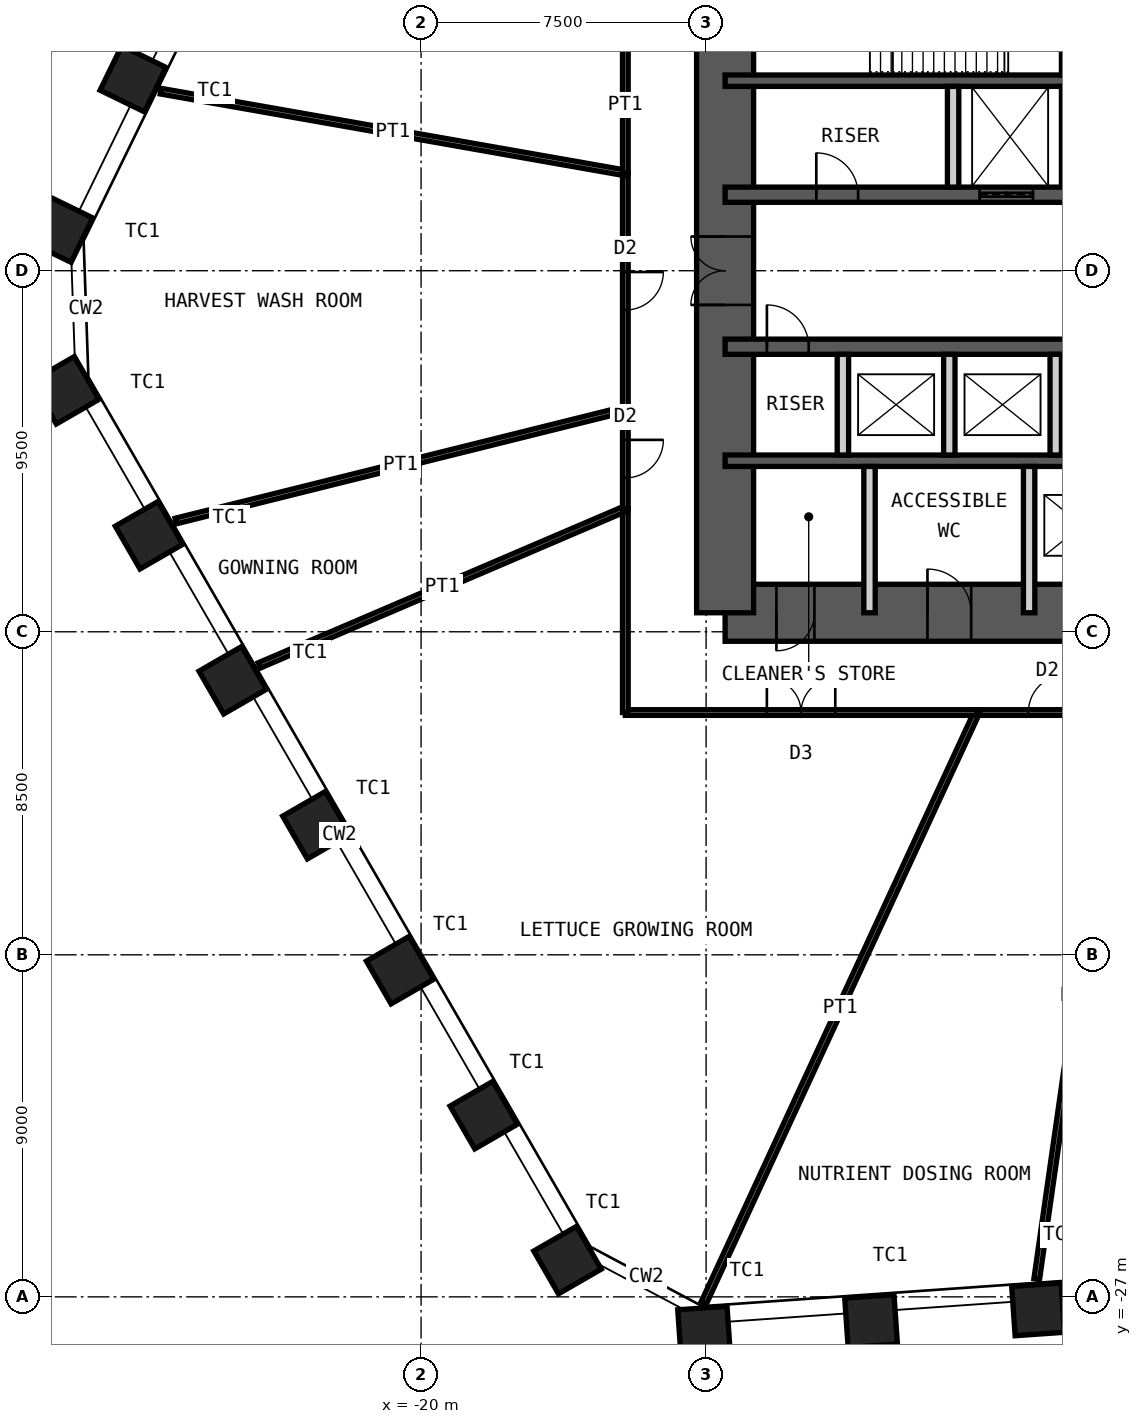
"""IFC4 building model, lengths in metres.
Left out: names, types, materials, properties, quantities, classifications, styles, units other than length and angle.
Written with IfcOpenShell. Run it as: python <this file> out.ifc"""

import sys

from ifc_helpers import new_model, si_unit, direction, frame, frame_2d, origin, origin_2d, place, context, subcontext, project, spatial, rectangle, hollow_rectangle, extrude, element, fill, save


model = new_model("IFC4")
c1 = context("Model", 3, precision=1e-05, world=origin(), true_north=direction((0.0, 1.0)))
c2 = subcontext(c1, "Body", "Model", "MODEL_VIEW")
j1 = project(units=[si_unit("LENGTHUNIT", "METRE"), si_unit("PLANEANGLEUNIT", "RADIAN")], contexts=[c1])
p1 = place(None, origin())
s1 = spatial("IfcSite", under=j1, at=p1, CompositionType="ELEMENT")
p2 = place(p1, origin())
s2 = spatial("IfcBuilding", under=s1, at=p2, CompositionType="ELEMENT")
p3 = place(p2, frame((0.0, 0.0, 37.0)))
s3 = spatial("IfcBuildingStorey", under=s2, at=p3, CompositionType="ELEMENT", Elevation=37.0)
for number, where, z_axis, x_axis in (
    (1, (-3.765, -27.329, 0.0), (0.0, 0.0, 1.0), (0.998, 0.07, 0.0)),
    (2, (-8.159, -27.636, 0.0), (0.0, 0.0, 1.0), (0.998, 0.07, 0.0)),
    (3, (-12.553, -27.944, 0.0), (0.0, 0.0, 1.0), (0.998, 0.07, 0.0)),
    (4, (-16.147, -26.033, 0.0), (0.0, 0.0, 1.0), (0.5, -0.866, 0.0)),
    (5, (-18.349, -22.218, 0.0), (0.0, 0.0, 1.0), (0.5, -0.866, 0.0)),
    (6, (-20.552, -18.404, 0.0), (0.0, 0.0, 1.0), (0.5, -0.866, 0.0)),
    (7, (-22.754, -14.589, 0.0), (0.0, 0.0, 1.0), (0.5, -0.866, 0.0)),
    (8, (-24.956, -10.775, 0.0), (0.0, 0.0, 1.0), (0.5, -0.866, 0.0)),
    (9, (-27.158, -6.96, 0.0), (0.0, 0.0, 1.0), (0.5, -0.866, 0.0)),
    (10, (-29.361, -3.146, 0.0), (0.0, 0.0, 1.0), (0.5, -0.866, 0.0)),
    (11, (-29.509, 1.09, 0.0), (0.0, 0.0, 1.0), (-0.438, -0.899, 0.0)),
    (12, (-27.578, 5.049, 0.0), (0.0, 0.0, 1.0), (-0.438, -0.899, 0.0)),
):
    element("IfcColumn", number, at=place(p3, frame(where, z_axis=z_axis, x_axis=x_axis)), inside=s3, PredefinedType="COLUMN", context=c2, shape_type="SweptSolid", body=[
        extrude(hollow_rectangle(XDim=1.3, YDim=1.3, WallThickness=0.1, at=origin_2d()), origin(), (0.0, 0.0, 1.0), 5.0),
    ])
p4 = place(p3, frame((-12.0, -9.0, 0.0), z_axis=(0.0, 0.0, 1.0), x_axis=(1.0, 0.0, 0.0)))
e13 = element("IfcWall", 13, at=p4, inside=s3, PredefinedType="SHEAR", context=c2, shape_type="SweptSolid", body=[
    extrude(rectangle(XDim=24.0, YDim=1.5, at=frame_2d((12.0, 0.0))), origin(), (0.0, 0.0, 1.0), 5.0),
])
p5 = place(p4, frame((1.35, 0.0, 0.0)))
e14 = element("IfcOpeningElement", 14, at=p5, cuts=e13, PredefinedType="OPENING", context=c2, shape_type="SweptSolid", body=[
    extrude(rectangle(XDim=1.0, YDim=2.1, at=frame_2d((0.5, 1.05))), frame((0.0, 0.76, 0.0), z_axis=(0.0, -1.0, 0.0), x_axis=(1.0, 0.0, 0.0)), (0.0, 0.0, 1.0), 1.52),
])
p6 = place(p4, frame((5.325, 0.0, 0.0)))
e15 = element("IfcOpeningElement", 15, at=p6, cuts=e13, PredefinedType="OPENING", context=c2, shape_type="SweptSolid", body=[
    extrude(rectangle(XDim=1.15, YDim=2.1, at=frame_2d((0.575, 1.05))), frame((0.0, 0.76, 0.0), z_axis=(0.0, -1.0, 0.0), x_axis=(1.0, 0.0, 0.0)), (0.0, 0.0, 1.0), 1.52),
])
p7 = place(p4, frame((12.6, 0.0, 0.0)))
e16 = element("IfcOpeningElement", 16, at=p7, cuts=e13, PredefinedType="OPENING", context=c2, shape_type="SweptSolid", body=[
    extrude(rectangle(XDim=1.0, YDim=2.1, at=frame_2d((0.5, 1.05))), frame((0.0, 0.76, 0.0), z_axis=(0.0, -1.0, 0.0), x_axis=(1.0, 0.0, 0.0)), (0.0, 0.0, 1.0), 1.52),
])
p8 = place(p3, frame((-12.0, -9.0, 0.0), z_axis=(0.0, 0.0, 1.0), x_axis=(0.0, 1.0, 0.0)))
e17 = element("IfcWall", 17, at=p8, inside=s3, PredefinedType="SHEAR", context=c2, shape_type="SweptSolid", body=[
    extrude(rectangle(XDim=18.0, YDim=1.5, at=frame_2d((9.0, 0.0))), origin(), (0.0, 0.0, 1.0), 5.0),
])
p9 = place(p8, frame((8.1, 0.0, 0.0)))
e18 = element("IfcOpeningElement", 18, at=p9, cuts=e17, PredefinedType="OPENING", context=c2, shape_type="SweptSolid", body=[
    extrude(rectangle(XDim=1.8, YDim=2.1, at=frame_2d((0.9, 1.05))), frame((0.0, 0.76, 0.0), z_axis=(0.0, -1.0, 0.0), x_axis=(1.0, 0.0, 0.0)), (0.0, 0.0, 1.0), 1.52),
])
p10 = place(p3, frame((-12.0, 5.0, 0.0), z_axis=(0.0, 0.0, 1.0), x_axis=(1.0, 0.0, 0.0)))
e19 = element("IfcWall", 19, at=p10, inside=s3, PredefinedType="SHEAR", context=c2, shape_type="SweptSolid", body=[
    extrude(rectangle(XDim=24.0, YDim=0.3, at=frame_2d((12.0, 0.0))), origin(), (0.0, 0.0, 1.0), 5.0),
])
p11 = place(p3, frame((-12.0, 2.0, 0.0), z_axis=(0.0, 0.0, 1.0), x_axis=(1.0, 0.0, 0.0)))
e20 = element("IfcWall", 20, at=p11, inside=s3, PredefinedType="SHEAR", context=c2, shape_type="SweptSolid", body=[
    extrude(rectangle(XDim=24.0, YDim=0.4, at=frame_2d((12.0, 0.0))), origin(), (0.0, 0.0, 1.0), 5.0),
])
p12 = place(p11, frame((2.4, 0.0, 0.0)))
e21 = element("IfcOpeningElement", 21, at=p12, cuts=e20, PredefinedType="OPENING", context=c2, shape_type="SweptSolid", body=[
    extrude(rectangle(XDim=1.1, YDim=2.1, at=frame_2d((0.55, 1.05))), frame((0.0, 0.21, 0.0), z_axis=(0.0, -1.0, 0.0), x_axis=(1.0, 0.0, 0.0)), (0.0, 0.0, 1.0), 0.42),
])
p13 = place(p11, frame((22.0, 0.0, 0.0)))
e22 = element("IfcOpeningElement", 22, at=p13, cuts=e20, PredefinedType="OPENING", context=c2, shape_type="SweptSolid", body=[
    extrude(rectangle(XDim=1.1, YDim=2.1, at=frame_2d((0.55, 1.05))), frame((0.0, 0.21, 0.0), z_axis=(0.0, -1.0, 0.0), x_axis=(1.0, 0.0, 0.0)), (0.0, 0.0, 1.0), 0.42),
])
p14 = place(p11, frame((10.15, 0.0, 0.0)))
e23 = element("IfcOpeningElement", 23, at=p14, cuts=e20, PredefinedType="OPENING", context=c2, shape_type="SweptSolid", body=[
    extrude(rectangle(XDim=1.0, YDim=2.1, at=frame_2d((0.5, 1.05))), frame((0.0, 0.21, 0.0), z_axis=(0.0, -1.0, 0.0), x_axis=(1.0, 0.0, 0.0)), (0.0, 0.0, 1.0), 0.42),
])
p15 = place(p11, frame((6.7, 0.0, 0.0)))
e24 = element("IfcOpeningElement", 24, at=p15, cuts=e20, PredefinedType="OPENING", context=c2, shape_type="SweptSolid", body=[
    extrude(rectangle(XDim=1.4, YDim=2.4, at=frame_2d((0.7, 1.2))), frame((0.0, 0.21, 0.0), z_axis=(0.0, -1.0, 0.0), x_axis=(1.0, 0.0, 0.0)), (0.0, 0.0, 1.0), 0.42),
])
p16 = place(p11, frame((13.35, 0.0, 0.0)))
e25 = element("IfcOpeningElement", 25, at=p16, cuts=e20, PredefinedType="OPENING", context=c2, shape_type="SweptSolid", body=[
    extrude(rectangle(XDim=1.1, YDim=2.4, at=frame_2d((0.55, 1.2))), frame((0.0, 0.21, 0.0), z_axis=(0.0, -1.0, 0.0), x_axis=(1.0, 0.0, 0.0)), (0.0, 0.0, 1.0), 0.42),
])
p17 = place(p11, frame((16.15, 0.0, 0.0)))
e26 = element("IfcOpeningElement", 26, at=p17, cuts=e20, PredefinedType="OPENING", context=c2, shape_type="SweptSolid", body=[
    extrude(rectangle(XDim=1.1, YDim=2.4, at=frame_2d((0.55, 1.2))), frame((0.0, 0.21, 0.0), z_axis=(0.0, -1.0, 0.0), x_axis=(1.0, 0.0, 0.0)), (0.0, 0.0, 1.0), 0.42),
])
p18 = place(p11, frame((18.95, 0.0, 0.0)))
e27 = element("IfcOpeningElement", 27, at=p18, cuts=e20, PredefinedType="OPENING", context=c2, shape_type="SweptSolid", body=[
    extrude(rectangle(XDim=1.1, YDim=2.4, at=frame_2d((0.55, 1.2))), frame((0.0, 0.21, 0.0), z_axis=(0.0, -1.0, 0.0), x_axis=(1.0, 0.0, 0.0)), (0.0, 0.0, 1.0), 0.42),
])
p19 = place(p3, frame((-12.0, -2.0, 0.0), z_axis=(0.0, 0.0, 1.0), x_axis=(1.0, 0.0, 0.0)))
e28 = element("IfcWall", 28, at=p19, inside=s3, PredefinedType="SHEAR", context=c2, shape_type="SweptSolid", body=[
    extrude(rectangle(XDim=24.0, YDim=0.4, at=frame_2d((12.0, 0.0))), origin(), (0.0, 0.0, 1.0), 5.0),
])
p20 = place(p19, frame((1.1, 0.0, 0.0)))
e29 = element("IfcOpeningElement", 29, at=p20, cuts=e28, PredefinedType="OPENING", context=c2, shape_type="SweptSolid", body=[
    extrude(rectangle(XDim=1.1, YDim=2.1, at=frame_2d((0.55, 1.05))), frame((0.0, 0.21, 0.0), z_axis=(0.0, -1.0, 0.0), x_axis=(1.0, 0.0, 0.0)), (0.0, 0.0, 1.0), 0.42),
])
p21 = place(p19, frame((13.55, 0.0, 0.0)))
e30 = element("IfcOpeningElement", 30, at=p21, cuts=e28, PredefinedType="OPENING", context=c2, shape_type="SweptSolid", body=[
    extrude(rectangle(XDim=1.1, YDim=2.1, at=frame_2d((0.55, 1.05))), frame((0.0, 0.21, 0.0), z_axis=(0.0, -1.0, 0.0), x_axis=(1.0, 0.0, 0.0)), (0.0, 0.0, 1.0), 0.42),
])
p22 = place(p19, frame((20.7, 0.0, 0.0)))
e31 = element("IfcOpeningElement", 31, at=p22, cuts=e28, PredefinedType="OPENING", context=c2, shape_type="SweptSolid", body=[
    extrude(rectangle(XDim=1.1, YDim=2.1, at=frame_2d((0.55, 1.05))), frame((0.0, 0.21, 0.0), z_axis=(0.0, -1.0, 0.0), x_axis=(1.0, 0.0, 0.0)), (0.0, 0.0, 1.0), 0.42),
])
p23 = place(p3, frame((-12.0, -5.0, 0.0), z_axis=(0.0, 0.0, 1.0), x_axis=(1.0, 0.0, 0.0)))
e32 = element("IfcWall", 32, at=p23, inside=s3, PredefinedType="SHEAR", context=c2, shape_type="SweptSolid", body=[
    extrude(rectangle(XDim=24.0, YDim=0.3, at=frame_2d((12.0, 0.0))), origin(), (0.0, 0.0, 1.0), 5.0),
])
p24 = place(p3, frame((-3.0, 5.15, 0.0), z_axis=(0.0, 0.0, 1.0), x_axis=(0.0, 1.0, 0.0)))
e33 = element("IfcWall", 33, at=p24, inside=s3, PredefinedType="PARTITIONING", context=c2, shape_type="SweptSolid", body=[
    extrude(rectangle(XDim=3.85, YDim=0.3, at=frame_2d((1.925, 0.0))), origin(), (0.0, 0.0, 1.0), 4.78),
])
p25 = place(p24, frame((1.425, 0.0, 0.0)))
e34 = element("IfcOpeningElement", 34, at=p25, cuts=e33, PredefinedType="OPENING", context=c2, shape_type="SweptSolid", body=[
    extrude(rectangle(XDim=1.0, YDim=2.1, at=frame_2d((0.5, 1.05))), frame((0.0, 0.16, 0.0), z_axis=(0.0, -1.0, 0.0), x_axis=(1.0, 0.0, 0.0)), (0.0, 0.0, 1.0), 0.32),
])
for number, where, z_axis, x_axis in (
    (35, (-6.0, 2.2, 0.0), (0.0, 0.0, 1.0), (0.0, 1.0, 0.0)),
    (36, (-3.0, 2.2, 0.0), (0.0, 0.0, 1.0), (0.0, 1.0, 0.0)),
    (37, (-8.9, -4.85, 0.0), (0.0, 0.0, 1.0), (0.0, 1.0, 0.0)),
    (38, (-6.1, -4.85, 0.0), (0.0, 0.0, 1.0), (0.0, 1.0, 0.0)),
    (39, (-3.3, -4.85, 0.0), (0.0, 0.0, 1.0), (0.0, 1.0, 0.0)),
):
    element("IfcWall", number, at=place(p3, frame(where, z_axis=z_axis, x_axis=x_axis)), inside=s3, PredefinedType="PARTITIONING", context=c2, shape_type="SweptSolid", body=[
        extrude(rectangle(XDim=2.65, YDim=0.3, at=frame_2d((1.325, 0.0))), origin(), (0.0, 0.0, 1.0), 4.78),
    ])
for number, where, z_axis, x_axis in (
    (40, (-8.2, -9.0, 0.0), (0.0, 0.0, 1.0), (0.0, 1.0, 0.0)),
    (41, (-4.0, -9.0, 0.0), (0.0, 0.0, 1.0), (0.0, 1.0, 0.0)),
):
    element("IfcWall", number, at=place(p3, frame(where, z_axis=z_axis, x_axis=x_axis)), inside=s3, PredefinedType="PARTITIONING", context=c2, shape_type="SweptSolid", body=[
        extrude(rectangle(XDim=3.85, YDim=0.3, at=frame_2d((1.925, 0.0))), origin(), (0.0, 0.0, 1.0), 4.78),
    ])
p26 = place(p3, frame((-3.8, -26.532, 0.0), z_axis=(0.0, 0.0, 1.0), x_axis=(0.14177542097, 0.989898848372, 0.0)))
e42 = element("IfcWall", 42, at=p26, inside=s3, PredefinedType="PARTITIONING", context=c2, shape_type="SweptSolid", body=[
    extrude(rectangle(XDim=15.059, YDim=0.15, at=frame_2d((7.53, 0.0))), origin(), (0.0, 0.0, 1.0), 3.7),
])
p27 = place(p3, frame((-1.665, -11.625, 0.0), z_axis=(0.0, 0.0, 1.0), x_axis=(-1.0, 0.0, 0.0)))
e43 = element("IfcWall", 43, at=p27, inside=s3, PredefinedType="PARTITIONING", context=c2, shape_type="SweptSolid", body=[
    extrude(rectangle(XDim=3.712, YDim=0.15, at=frame_2d((1.856, 0.0))), origin(), (0.0, 0.0, 1.0), 4.8),
])
p28 = place(p27, frame((1.356, 0.0, 0.0)))
e44 = element("IfcOpeningElement", 44, at=p28, cuts=e43, PredefinedType="OPENING", context=c2, shape_type="SweptSolid", body=[
    extrude(rectangle(XDim=1.0, YDim=2.4, at=frame_2d((0.5, 1.2))), frame((0.0, 0.085, 0.0), z_axis=(0.0, -1.0, 0.0), x_axis=(1.0, 0.0, 0.0)), (0.0, 0.0, 1.0), 0.17),
])
p29 = place(p3, frame((-12.56, -27.155, 0.0), z_axis=(0.0, 0.0, 1.0), x_axis=(0.419799104875, 0.907617051154, 0.0)))
e45 = element("IfcWall", 45, at=p29, inside=s3, PredefinedType="PARTITIONING", context=c2, shape_type="SweptSolid", body=[
    extrude(rectangle(XDim=17.11, YDim=0.15, at=frame_2d((8.555, 0.0))), origin(), (0.0, 0.0, 1.0), 3.7),
])
p30 = place(p3, frame((-5.377, -11.625, 0.0), z_axis=(0.0, 0.0, 1.0), x_axis=(-1.0, 0.0, 0.0)))
e46 = element("IfcWall", 46, at=p30, inside=s3, PredefinedType="PARTITIONING", context=c2, shape_type="SweptSolid", body=[
    extrude(rectangle(XDim=9.248, YDim=0.15, at=frame_2d((4.624, 0.0))), origin(), (0.0, 0.0, 1.0), 4.8),
])
p31 = place(p30, frame((3.724, 0.0, 0.0)))
e47 = element("IfcOpeningElement", 47, at=p31, cuts=e46, PredefinedType="OPENING", context=c2, shape_type="SweptSolid", body=[
    extrude(rectangle(XDim=1.8, YDim=2.4, at=frame_2d((0.9, 1.2))), frame((0.0, 0.085, 0.0), z_axis=(0.0, -1.0, 0.0), x_axis=(1.0, 0.0, 0.0)), (0.0, 0.0, 1.0), 0.17),
])
p32 = place(p3, frame((-14.625, -11.625, 0.0), z_axis=(0.0, 0.0, 1.0), x_axis=(0.0, 1.0, 0.0)))
e48 = element("IfcWall", 48, at=p32, inside=s3, PredefinedType="PARTITIONING", context=c2, shape_type="SweptSolid", body=[
    extrude(rectangle(XDim=5.364, YDim=0.15, at=frame_2d((2.682, 0.0))), origin(), (0.0, 0.0, 1.0), 4.8),
])
p33 = place(p3, frame((-24.258, -10.385, 0.0), z_axis=(0.0, 0.0, 1.0), x_axis=(0.919298009201, 0.393562155547, 0.0)))
e49 = element("IfcWall", 49, at=p33, inside=s3, PredefinedType="PARTITIONING", context=c2, shape_type="SweptSolid", body=[
    extrude(rectangle(XDim=10.479, YDim=0.15, at=frame_2d((5.239, 0.0))), origin(), (0.0, 0.0, 1.0), 3.7),
])
p34 = place(p3, frame((-14.625, -6.261, 0.0), z_axis=(0.0, 0.0, 1.0), x_axis=(0.0, 1.0, 0.0)))
e50 = element("IfcWall", 50, at=p34, inside=s3, PredefinedType="PARTITIONING", context=c2, shape_type="SweptSolid", body=[
    extrude(rectangle(XDim=2.62, YDim=0.15, at=frame_2d((1.31, 0.0))), origin(), (0.0, 0.0, 1.0), 4.8),
])
p35 = place(p34, frame((0.81, 0.0, 0.0)))
e51 = element("IfcOpeningElement", 51, at=p35, cuts=e50, PredefinedType="OPENING", context=c2, shape_type="SweptSolid", body=[
    extrude(rectangle(XDim=1.0, YDim=2.4, at=frame_2d((0.5, 1.2))), frame((0.0, 0.085, 0.0), z_axis=(0.0, -1.0, 0.0), x_axis=(1.0, 0.0, 0.0)), (0.0, 0.0, 1.0), 0.17),
])
p36 = place(p3, frame((-26.455, -6.586, 0.0), z_axis=(0.0, 0.0, 1.0), x_axis=(0.970383505188, 0.241569561118, 0.0)))
e52 = element("IfcWall", 52, at=p36, inside=s3, PredefinedType="PARTITIONING", context=c2, shape_type="SweptSolid", body=[
    extrude(rectangle(XDim=12.191, YDim=0.15, at=frame_2d((6.096, 0.0))), origin(), (0.0, 0.0, 1.0), 3.7),
])
p37 = place(p3, frame((-14.625, -3.641, 0.0), z_axis=(0.0, 0.0, 1.0), x_axis=(0.0, 1.0, 0.0)))
e53 = element("IfcWall", 53, at=p37, inside=s3, PredefinedType="PARTITIONING", context=c2, shape_type="SweptSolid", body=[
    extrude(rectangle(XDim=6.214, YDim=0.15, at=frame_2d((3.107, 0.0))), origin(), (0.0, 0.0, 1.0), 4.8),
])
p38 = place(p37, frame((2.607, 0.0, 0.0)))
e54 = element("IfcOpeningElement", 54, at=p38, cuts=e53, PredefinedType="OPENING", context=c2, shape_type="SweptSolid", body=[
    extrude(rectangle(XDim=1.0, YDim=2.4, at=frame_2d((0.5, 1.2))), frame((0.0, 0.085, 0.0), z_axis=(0.0, -1.0, 0.0), x_axis=(1.0, 0.0, 0.0)), (0.0, 0.0, 1.0), 0.17),
])
p39 = place(p3, frame((-26.85, 4.725, 0.0), z_axis=(0.0, 0.0, 1.0), x_axis=(0.984869569104, -0.173297235559, 0.0)))
e55 = element("IfcWall", 55, at=p39, inside=s3, PredefinedType="PARTITIONING", context=c2, shape_type="SweptSolid", body=[
    extrude(rectangle(XDim=12.413, YDim=0.15, at=frame_2d((6.207, 0.0))), origin(), (0.0, 0.0, 1.0), 3.7),
])
p40 = place(p3, frame((-14.625, 2.573, 0.0), z_axis=(0.0, 0.0, 1.0), x_axis=(0.0, 1.0, 0.0)))
e56 = element("IfcWall", 56, at=p40, inside=s3, PredefinedType="PARTITIONING", context=c2, shape_type="SweptSolid", body=[
    extrude(rectangle(XDim=8.915, YDim=0.15, at=frame_2d((4.457, 0.0))), origin(), (0.0, 0.0, 1.0), 4.8),
])
p41 = place(p40, frame((3.557, 0.0, 0.0)))
e57 = element("IfcOpeningElement", 57, at=p41, cuts=e56, PredefinedType="OPENING", context=c2, shape_type="SweptSolid", body=[
    extrude(rectangle(XDim=1.8, YDim=2.4, at=frame_2d((0.9, 1.2))), frame((0.0, 0.085, 0.0), z_axis=(0.0, -1.0, 0.0), x_axis=(1.0, 0.0, 0.0)), (0.0, 0.0, 1.0), 0.17),
])
p42 = place(p5, origin())
e58 = element("IfcDoor", 58, at=p42, inside=s3, OperationType="SINGLE_SWING_LEFT", PredefinedType="DOOR", context=c2, shape_type="SweptSolid", body=[
    extrude(rectangle(XDim=1.0, YDim=2.1, at=frame_2d((0.5, 1.05))), frame((0.0, 0.025, 0.0), z_axis=(0.0, -1.0, 0.0), x_axis=(1.0, 0.0, 0.0)), (0.0, 0.0, 1.0), 0.05),
])
fill(e14, e58)
p43 = place(p6, origin())
e59 = element("IfcDoor", 59, at=p43, inside=s3, OperationType="SINGLE_SWING_RIGHT", PredefinedType="DOOR", context=c2, shape_type="SweptSolid", body=[
    extrude(rectangle(XDim=1.15, YDim=2.1, at=frame_2d((0.575, 1.05))), frame((0.0, 0.025, 0.0), z_axis=(0.0, -1.0, 0.0), x_axis=(1.0, 0.0, 0.0)), (0.0, 0.0, 1.0), 0.05),
])
fill(e15, e59)
p44 = place(p12, origin())
e60 = element("IfcDoor", 60, at=p44, inside=s3, OperationType="SINGLE_SWING_RIGHT", PredefinedType="DOOR", context=c2, shape_type="SweptSolid", body=[
    extrude(rectangle(XDim=1.1, YDim=2.1, at=frame_2d((0.55, 1.05))), frame((0.0, 0.025, 0.0), z_axis=(0.0, -1.0, 0.0), x_axis=(1.0, 0.0, 0.0)), (0.0, 0.0, 1.0), 0.05),
])
fill(e21, e60)
p45 = place(p20, origin())
e61 = element("IfcDoor", 61, at=p45, inside=s3, OperationType="SINGLE_SWING_RIGHT", PredefinedType="DOOR", context=c2, shape_type="SweptSolid", body=[
    extrude(rectangle(XDim=1.1, YDim=2.1, at=frame_2d((0.55, 1.05))), frame((0.0, 0.025, 0.0), z_axis=(0.0, -1.0, 0.0), x_axis=(1.0, 0.0, 0.0)), (0.0, 0.0, 1.0), 0.05),
])
fill(e29, e61)
p46 = place(p9, origin())
e62 = element("IfcDoor", 62, at=p46, inside=s3, OperationType="DOUBLE_DOOR_DOUBLE_SWING", PredefinedType="DOOR", context=c2, shape_type="SweptSolid", body=[
    extrude(rectangle(XDim=1.8, YDim=2.1, at=frame_2d((0.9, 1.05))), frame((0.0, 0.025, 0.0), z_axis=(0.0, -1.0, 0.0), x_axis=(1.0, 0.0, 0.0)), (0.0, 0.0, 1.0), 0.05),
])
fill(e18, e62)
p47 = place(p15, origin())
e63 = element("IfcDoor", 63, at=p47, inside=s3, OperationType="DOUBLE_DOOR_SLIDING", PredefinedType="DOOR", context=c2, shape_type="SweptSolid", body=[
    extrude(rectangle(XDim=1.4, YDim=2.4, at=frame_2d((0.7, 1.2))), frame((0.0, 0.025, 0.0), z_axis=(0.0, -1.0, 0.0), x_axis=(1.0, 0.0, 0.0)), (0.0, 0.0, 1.0), 0.05),
])
fill(e24, e63)
p48 = place(p28, origin())
e64 = element("IfcDoor", 64, at=p48, inside=s3, OperationType="SINGLE_SWING_LEFT", PredefinedType="DOOR", context=c2, shape_type="SweptSolid", body=[
    extrude(rectangle(XDim=1.0, YDim=2.4, at=frame_2d((0.5, 1.2))), frame((0.0, 0.025, 0.0), z_axis=(0.0, -1.0, 0.0), x_axis=(1.0, 0.0, 0.0)), (0.0, 0.0, 1.0), 0.05),
])
fill(e44, e64)
p49 = place(p31, origin())
e65 = element("IfcDoor", 65, at=p49, inside=s3, OperationType="DOUBLE_DOOR_DOUBLE_SWING", PredefinedType="DOOR", context=c2, shape_type="SweptSolid", body=[
    extrude(rectangle(XDim=1.8, YDim=2.4, at=frame_2d((0.9, 1.2))), frame((0.0, 0.025, 0.0), z_axis=(0.0, -1.0, 0.0), x_axis=(1.0, 0.0, 0.0)), (0.0, 0.0, 1.0), 0.05),
])
fill(e47, e65)
p50 = place(p35, origin())
e66 = element("IfcDoor", 66, at=p50, inside=s3, OperationType="SINGLE_SWING_RIGHT", PredefinedType="DOOR", context=c2, shape_type="SweptSolid", body=[
    extrude(rectangle(XDim=1.0, YDim=2.4, at=frame_2d((0.5, 1.2))), frame((0.0, 0.025, 0.0), z_axis=(0.0, -1.0, 0.0), x_axis=(1.0, 0.0, 0.0)), (0.0, 0.0, 1.0), 0.05),
])
fill(e51, e66)
p51 = place(p38, origin())
e67 = element("IfcDoor", 67, at=p51, inside=s3, OperationType="SINGLE_SWING_RIGHT", PredefinedType="DOOR", context=c2, shape_type="SweptSolid", body=[
    extrude(rectangle(XDim=1.0, YDim=2.4, at=frame_2d((0.5, 1.2))), frame((0.0, 0.025, 0.0), z_axis=(0.0, -1.0, 0.0), x_axis=(1.0, 0.0, 0.0)), (0.0, 0.0, 1.0), 0.05),
])
fill(e54, e67)
save(model, sys.argv[1])
